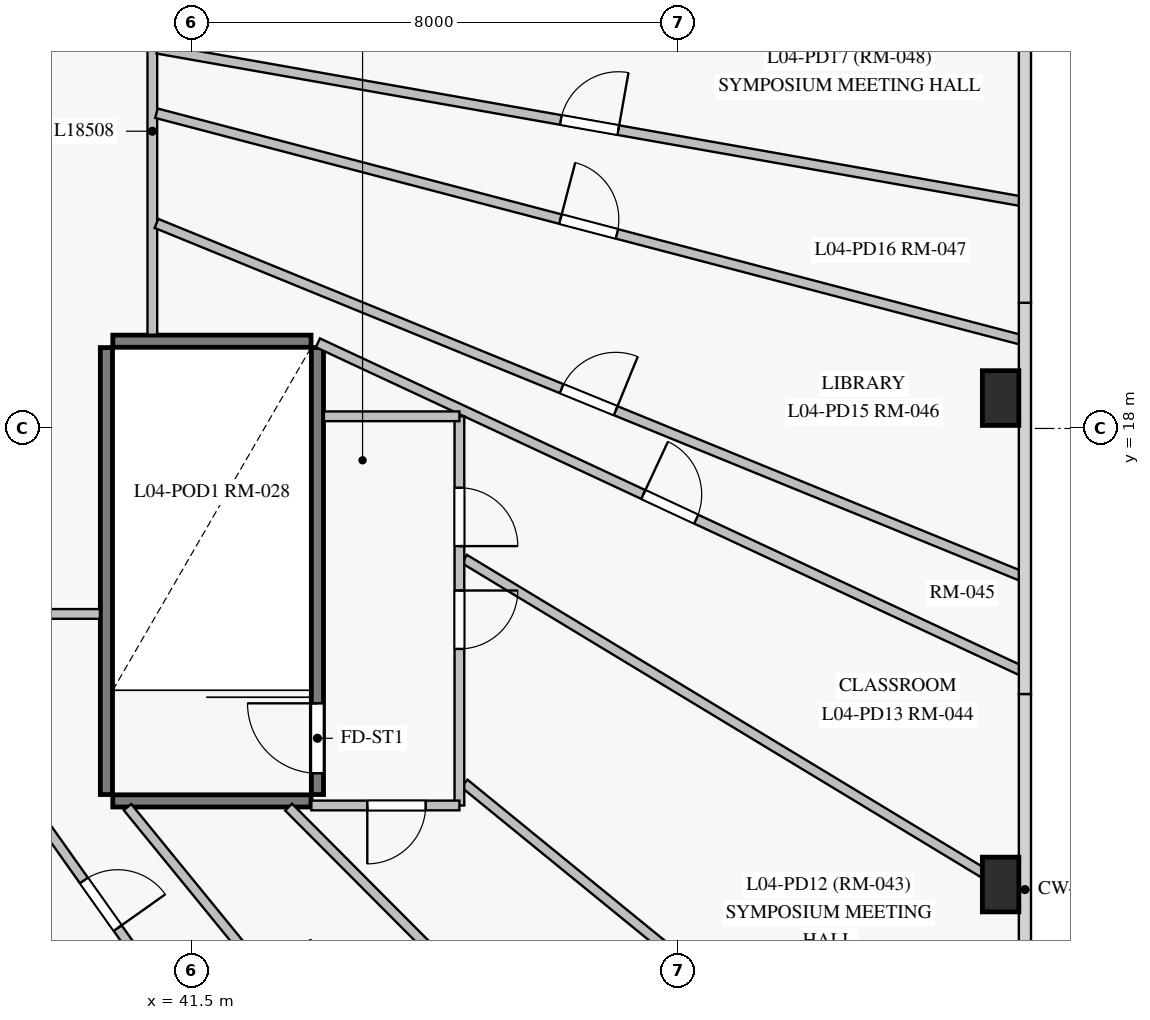
"""IFC4 building model, lengths in metres.
Left out: names, types, materials, properties, quantities, classifications, styles, units other than length and angle.
Written with IfcOpenShell. Run it as: python <this file> out.ifc"""

import sys

from ifc_helpers import new_model, si_unit, direction, frame, frame_2d, origin, origin_with_axes, origin_2d, place, context, subcontext, project, spatial, rectangle, extrude, source, transform, mapped, element, fill, save


model = new_model("IFC4")
c1 = context("Model", 3, precision=1e-05, world=origin(), true_north=direction((0.0, 1.0)))
c2 = subcontext(c1, "Body", "Model", "MODEL_VIEW")
j1 = project(units=[si_unit("LENGTHUNIT", "METRE"), si_unit("PLANEANGLEUNIT", "RADIAN")], contexts=[c1])
p1 = place(None, origin())
s1 = spatial("IfcSite", under=j1, at=p1, CompositionType="ELEMENT")
p2 = place(p1, origin())
s2 = spatial("IfcBuilding", under=s1, at=p2, CompositionType="ELEMENT")
p3 = place(p2, frame((0.0, 0.0, 18.0)))
s3 = spatial("IfcBuildingStorey", under=s2, at=p3, CompositionType="ELEMENT", Elevation=18.0)
m1 = source(origin_with_axes(), c2, "Body", "SweptSolid", [
    extrude(rectangle(XDim=0.6, YDim=0.9, at=origin_2d()), origin(), (0.0, 0.0, 1.0), 4.5),
])
for number, where, z_axis, x_axis in (
    (1, (54.8, 10.5, 0.0), (0.0, 0.0, 1.0), (1.0, 0.0, 0.0)),
    (2, (54.8, 18.5, 0.0), (0.0, 0.0, 1.0), (1.0, 0.0, 0.0)),
):
    element("IfcColumn", number, at=place(p3, frame(where, z_axis=z_axis, x_axis=x_axis)), inside=s3, PredefinedType="PILASTER", context=c2, shape_type="MappedRepresentation", body=[
        mapped(m1, transform((0.0, 0.0, 0.0), scale=1.0)),
    ])
p4 = place(p3, frame((40.095, 11.98, 0.0), z_axis=(0.0, 0.0, 1.0), x_axis=(0.0, 1.0, 0.0)))
e3 = element("IfcWall", 3, at=p4, inside=s3, PredefinedType="SHEAR", context=c2, shape_type="SweptSolid", body=[
    extrude(rectangle(XDim=7.35, YDim=0.2, at=frame_2d((3.675, 0.0))), origin(), (0.0, 0.0, 1.0), 4.225),
])
p5 = place(p3, frame((43.565, 11.98, 0.0), z_axis=(0.0, 0.0, 1.0), x_axis=(0.0, 1.0, 0.0)))
e4 = element("IfcWall", 4, at=p5, inside=s3, PredefinedType="SHEAR", context=c2, shape_type="SweptSolid", body=[
    extrude(rectangle(XDim=7.35, YDim=0.2, at=frame_2d((3.675, 0.0))), origin(), (0.0, 0.0, 1.0), 4.225),
])
p6 = place(p5, frame((0.35, 0.0, 0.0)))
e5 = element("IfcOpeningElement", 5, at=p6, cuts=e4, PredefinedType="OPENING", context=c2, shape_type="SweptSolid", body=[
    extrude(rectangle(XDim=1.15, YDim=2.15, at=frame_2d((0.575, 1.075))), frame((0.0, 0.11, 0.0), z_axis=(0.0, -1.0, 0.0), x_axis=(1.0, 0.0, 0.0)), (0.0, 0.0, 1.0), 0.22),
])
for number, where, z_axis, x_axis in (
    (6, (40.2, 11.875, 0.0), (0.0, 0.0, 1.0), (1.0, 0.0, 0.0)),
    (7, (40.2, 19.435, 0.0), (0.0, 0.0, 1.0), (1.0, 0.0, 0.0)),
):
    element("IfcWall", number, at=place(p3, frame(where, z_axis=z_axis, x_axis=x_axis)), inside=s3, PredefinedType="SHEAR", context=c2, shape_type="SweptSolid", body=[
        extrude(rectangle(XDim=3.26, YDim=0.2, at=frame_2d((1.63, 0.0))), origin(), (0.0, 0.0, 1.0), 4.225),
    ])
p7 = place(p3, frame((40.85, 38.05, 0.0), z_axis=(0.0, 0.0, 1.0), x_axis=(0.0, -1.0, 0.0)))
e8 = element("IfcWall", 8, at=p7, inside=s3, PredefinedType="PARTITIONING", context=c2, shape_type="SweptSolid", body=[
    extrude(rectangle(XDim=18.508, YDim=0.16, at=frame_2d((9.254, 0.0))), origin(), (0.0, 0.0, 1.0), 2.725),
])
p8 = place(p7, frame((10.856, 0.0, 0.0)))
e9 = element("IfcOpeningElement", 9, at=p8, cuts=e8, PredefinedType="OPENING", context=c2, shape_type="SweptSolid", body=[
    extrude(rectangle(XDim=0.96, YDim=2.15, at=frame_2d((0.48, 1.075))), frame((0.0, 0.09, 0.0), z_axis=(0.0, -1.0, 0.0), x_axis=(1.0, 0.0, 0.0)), (0.0, 0.0, 1.0), 0.18),
])
p9 = place(p7, frame((8.695, 0.0, 0.0)))
e10 = element("IfcOpeningElement", 10, at=p9, cuts=e8, PredefinedType="OPENING", context=c2, shape_type="SweptSolid", body=[
    extrude(rectangle(XDim=0.96, YDim=2.15, at=frame_2d((0.48, 1.075))), frame((0.0, 0.09, 0.0), z_axis=(0.0, -1.0, 0.0), x_axis=(1.0, 0.0, 0.0)), (0.0, 0.0, 1.0), 0.18),
])
p10 = place(p7, frame((5.944, 0.0, 0.0)))
e11 = element("IfcOpeningElement", 11, at=p10, cuts=e8, PredefinedType="OPENING", context=c2, shape_type="SweptSolid", body=[
    extrude(rectangle(XDim=0.96, YDim=2.15, at=frame_2d((0.48, 1.075))), frame((0.0, 0.09, 0.0), z_axis=(0.0, -1.0, 0.0), x_axis=(1.0, 0.0, 0.0)), (0.0, 0.0, 1.0), 0.18),
])
p11 = place(p3, frame((40.918, 21.372, 0.0), z_axis=(0.0, 0.0, 1.0), x_axis=(0.92597161246, -0.377593131449, 0.0)))
e12 = element("IfcWall", 12, at=p11, inside=s3, PredefinedType="PARTITIONING", context=c2, shape_type="SweptSolid", body=[
    extrude(rectangle(XDim=15.392, YDim=0.16, at=frame_2d((7.696, 0.0))), origin(), (0.0, 0.0, 1.0), 2.725),
])
p12 = place(p11, frame((7.196, 0.0, 0.0)))
e13 = element("IfcOpeningElement", 13, at=p12, cuts=e12, PredefinedType="OPENING", context=c2, shape_type="SweptSolid", body=[
    extrude(rectangle(XDim=0.96, YDim=2.15, at=frame_2d((0.48, 1.075))), frame((0.0, 0.09, 0.0), z_axis=(0.0, -1.0, 0.0), x_axis=(1.0, 0.0, 0.0)), (0.0, 0.0, 1.0), 0.18),
])
p13 = place(p3, frame((40.917, 23.184, 0.0), z_axis=(0.0, 0.0, 1.0), x_axis=(0.967334122043, -0.253504825064, 0.0)))
e14 = element("IfcWall", 14, at=p13, inside=s3, PredefinedType="PARTITIONING", context=c2, shape_type="SweptSolid", body=[
    extrude(rectangle(XDim=14.737, YDim=0.16, at=frame_2d((7.368, 0.0))), origin(), (0.0, 0.0, 1.0), 3.725),
])
p14 = place(p13, frame((6.868, 0.0, 0.0)))
e15 = element("IfcOpeningElement", 15, at=p14, cuts=e14, PredefinedType="OPENING", context=c2, shape_type="SweptSolid", body=[
    extrude(rectangle(XDim=0.96, YDim=2.15, at=frame_2d((0.48, 1.075))), frame((0.0, 0.09, 0.0), z_axis=(0.0, -1.0, 0.0), x_axis=(1.0, 0.0, 0.0)), (0.0, 0.0, 1.0), 0.18),
])
p15 = place(p3, frame((40.932, 24.244, 0.0), z_axis=(0.0, 0.0, 1.0), x_axis=(0.984776590319, -0.173824817446, 0.0)))
e16 = element("IfcWall", 16, at=p15, inside=s3, PredefinedType="PARTITIONING", context=c2, shape_type="SweptSolid", body=[
    extrude(rectangle(XDim=14.462, YDim=0.16, at=frame_2d((7.231, 0.0))), origin(), (0.0, 0.0, 1.0), 3.725),
])
p16 = place(p15, frame((6.739, 0.0, 0.0)))
e17 = element("IfcOpeningElement", 17, at=p16, cuts=e16, PredefinedType="OPENING", context=c2, shape_type="SweptSolid", body=[
    extrude(rectangle(XDim=0.96, YDim=2.15, at=frame_2d((0.48, 1.075))), frame((0.0, 0.09, 0.0), z_axis=(0.0, -1.0, 0.0), x_axis=(1.0, 0.0, 0.0)), (0.0, 0.0, 1.0), 0.18),
])
p17 = place(p3, frame((39.988, 14.95, 0.0), z_axis=(0.0, 0.0, 1.0), x_axis=(-1.0, 0.0, 0.0)))
e18 = element("IfcWall", 18, at=p17, inside=s3, PredefinedType="PARTITIONING", context=c2, shape_type="SweptSolid", body=[
    extrude(rectangle(XDim=14.588, YDim=0.16, at=frame_2d((7.294, 0.0))), origin(), (0.0, 0.0, 1.0), 2.825),
])
p18 = place(p17, frame((10.34, 0.0, 0.0)))
e19 = element("IfcOpeningElement", 19, at=p18, cuts=e18, PredefinedType="OPENING", context=c2, shape_type="SweptSolid", body=[
    extrude(rectangle(XDim=0.96, YDim=2.15, at=frame_2d((0.48, 1.075))), frame((0.0, 0.09, 0.0), z_axis=(0.0, -1.0, 0.0), x_axis=(1.0, 0.0, 0.0)), (0.0, 0.0, 1.0), 0.18),
])
p19 = place(p17, frame((6.735, 0.0, 0.0)))
e20 = element("IfcOpeningElement", 20, at=p19, cuts=e18, PredefinedType="OPENING", context=c2, shape_type="SweptSolid", body=[
    extrude(rectangle(XDim=0.96, YDim=2.15, at=frame_2d((0.48, 1.075))), frame((0.0, 0.09, 0.0), z_axis=(0.0, -1.0, 0.0), x_axis=(1.0, 0.0, 0.0)), (0.0, 0.0, 1.0), 0.18),
])
p20 = place(p17, frame((4.182, 0.0, 0.0)))
e21 = element("IfcOpeningElement", 21, at=p20, cuts=e18, PredefinedType="OPENING", context=c2, shape_type="SweptSolid", body=[
    extrude(rectangle(XDim=0.96, YDim=2.15, at=frame_2d((0.48, 1.075))), frame((0.0, 0.09, 0.0), z_axis=(0.0, -1.0, 0.0), x_axis=(1.0, 0.0, 0.0)), (0.0, 0.0, 1.0), 0.18),
])
p21 = place(p3, frame((43.573, 19.408, 0.0), z_axis=(0.0, 0.0, 1.0), x_axis=(0.906378533885, -0.422466511468, 0.0)))
e22 = element("IfcWall", 22, at=p21, inside=s3, PredefinedType="PARTITIONING", context=c2, shape_type="SweptSolid", body=[
    extrude(rectangle(XDim=12.794, YDim=0.16, at=frame_2d((6.397, 0.0))), origin(), (0.0, 0.0, 1.0), 2.725),
])
p22 = place(p21, frame((5.905, 0.0, 0.0)))
e23 = element("IfcOpeningElement", 23, at=p22, cuts=e22, PredefinedType="OPENING", context=c2, shape_type="SweptSolid", body=[
    extrude(rectangle(XDim=0.96, YDim=2.15, at=frame_2d((0.48, 1.075))), frame((0.0, 0.09, 0.0), z_axis=(0.0, -1.0, 0.0), x_axis=(1.0, 0.0, 0.0)), (0.0, 0.0, 1.0), 0.18),
])
p23 = place(p3, frame((36.666, 14.88, 0.0), z_axis=(0.0, 0.0, 1.0), x_axis=(0.578443831224, -0.815722216272, 0.0)))
e24 = element("IfcWall", 24, at=p23, inside=s3, PredefinedType="PARTITIONING", context=c2, shape_type="SweptSolid", body=[
    extrude(rectangle(XDim=11.576, YDim=0.16, at=frame_2d((5.788, 0.0))), origin(), (0.0, 0.0, 1.0), 4.225),
])
p24 = place(p23, frame((5.288, 0.0, 0.0)))
e25 = element("IfcOpeningElement", 25, at=p24, cuts=e24, PredefinedType="OPENING", context=c2, shape_type="SweptSolid", body=[
    extrude(rectangle(XDim=0.96, YDim=2.15, at=frame_2d((0.48, 1.075))), frame((0.0, 0.09, 0.0), z_axis=(0.0, -1.0, 0.0), x_axis=(1.0, 0.0, 0.0)), (0.0, 0.0, 1.0), 0.18),
])
p25 = place(p3, frame((45.982, 15.853, 0.0), z_axis=(0.0, 0.0, 1.0), x_axis=(0.855606653808, -0.517626558398, 0.0)))
e26 = element("IfcWall", 26, at=p25, inside=s3, PredefinedType="PARTITIONING", context=c2, shape_type="SweptSolid", body=[
    extrude(rectangle(XDim=10.733, YDim=0.16, at=frame_2d((5.367, 0.0))), origin(), (0.0, 0.0, 1.0), 4.225),
])
p26 = place(p3, frame((34.431, 14.868, 0.0), z_axis=(0.0, 0.0, 1.0), x_axis=(0.458318369651, -0.888788091752, 0.0)))
e27 = element("IfcWall", 27, at=p26, inside=s3, PredefinedType="PARTITIONING", context=c2, shape_type="SweptSolid", body=[
    extrude(rectangle(XDim=10.616, YDim=0.16, at=frame_2d((5.308, 0.0))), origin(), (0.0, 0.0, 1.0), 4.225),
])
p27 = place(p3, frame((45.982, 12.162, 0.0), z_axis=(0.0, 0.0, 1.0), x_axis=(0.774901017442, -0.632082599956, 0.0)))
e28 = element("IfcWall", 28, at=p27, inside=s3, PredefinedType="PARTITIONING", context=c2, shape_type="SweptSolid", body=[
    extrude(rectangle(XDim=10.053, YDim=0.16, at=frame_2d((5.027, 0.0))), origin(), (0.0, 0.0, 1.0), 4.225),
])
p28 = place(p3, frame((40.442, 11.773, 0.0), z_axis=(0.0, 0.0, 1.0), x_axis=(0.632298947072, -0.774724493954, 0.0)))
e29 = element("IfcWall", 29, at=p28, inside=s3, PredefinedType="PARTITIONING", context=c2, shape_type="SweptSolid", body=[
    extrude(rectangle(XDim=8.175, YDim=0.16, at=frame_2d((4.087, 0.0))), origin(), (0.0, 0.0, 1.0), 4.225),
])
p29 = place(p28, frame((3.595, 0.0, 0.0)))
e30 = element("IfcOpeningElement", 30, at=p29, cuts=e29, PredefinedType="OPENING", context=c2, shape_type="SweptSolid", body=[
    extrude(rectangle(XDim=0.96, YDim=2.15, at=frame_2d((0.48, 1.075))), frame((0.0, 0.09, 0.0), z_axis=(0.0, -1.0, 0.0), x_axis=(1.0, 0.0, 0.0)), (0.0, 0.0, 1.0), 0.18),
])
p30 = place(p3, frame((45.9, 18.2, 0.0), z_axis=(0.0, 0.0, 1.0), x_axis=(0.0, -1.0, 0.0)))
e31 = element("IfcWall", 31, at=p30, inside=s3, PredefinedType="PARTITIONING", context=c2, shape_type="SweptSolid", body=[
    extrude(rectangle(XDim=6.4, YDim=0.16, at=frame_2d((3.2, 0.0))), origin(), (0.0, 0.0, 1.0), 4.225),
])
p31 = place(p30, frame((2.865, 0.0, 0.0)))
e32 = element("IfcOpeningElement", 32, at=p31, cuts=e31, PredefinedType="OPENING", context=c2, shape_type="SweptSolid", body=[
    extrude(rectangle(XDim=0.96, YDim=2.15, at=frame_2d((0.48, 1.075))), frame((0.0, 0.09, 0.0), z_axis=(0.0, -1.0, 0.0), x_axis=(1.0, 0.0, 0.0)), (0.0, 0.0, 1.0), 0.18),
])
p32 = place(p30, frame((1.175, 0.0, 0.0)))
e33 = element("IfcOpeningElement", 33, at=p32, cuts=e31, PredefinedType="OPENING", context=c2, shape_type="SweptSolid", body=[
    extrude(rectangle(XDim=0.96, YDim=2.15, at=frame_2d((0.48, 1.075))), frame((0.0, 0.09, 0.0), z_axis=(0.0, -1.0, 0.0), x_axis=(1.0, 0.0, 0.0)), (0.0, 0.0, 1.0), 0.18),
])
p33 = place(p3, frame((43.091, 11.773, 0.0), z_axis=(0.0, 0.0, 1.0), x_axis=(0.705853252823, -0.708358091278, 0.0)))
e34 = element("IfcWall", 34, at=p33, inside=s3, PredefinedType="PARTITIONING", context=c2, shape_type="SweptSolid", body=[
    extrude(rectangle(XDim=4.776, YDim=0.16, at=frame_2d((2.388, 0.0))), origin(), (0.0, 0.0, 1.0), 2.725),
])
p34 = place(p3, frame((45.9, 11.8, 0.0), z_axis=(0.0, 0.0, 1.0), x_axis=(-1.0, 0.0, 0.0)))
e35 = element("IfcWall", 35, at=p34, inside=s3, PredefinedType="PARTITIONING", context=c2, shape_type="SweptSolid", body=[
    extrude(rectangle(XDim=2.435, YDim=0.16, at=frame_2d((1.217, 0.0))), origin(), (0.0, 0.0, 1.0), 4.225),
])
p35 = place(p34, frame((0.555, 0.0, 0.0)))
e36 = element("IfcOpeningElement", 36, at=p35, cuts=e35, PredefinedType="OPENING", context=c2, shape_type="SweptSolid", body=[
    extrude(rectangle(XDim=0.96, YDim=2.15, at=frame_2d((0.48, 1.075))), frame((0.0, 0.09, 0.0), z_axis=(0.0, -1.0, 0.0), x_axis=(1.0, 0.0, 0.0)), (0.0, 0.0, 1.0), 0.18),
])
p36 = place(p3, frame((43.672, 18.2, 0.0), z_axis=(0.0, 0.0, 1.0), x_axis=(1.0, 0.0, 0.0)))
e37 = element("IfcWall", 37, at=p36, inside=s3, PredefinedType="PARTITIONING", context=c2, shape_type="SweptSolid", body=[
    extrude(rectangle(XDim=2.228, YDim=0.16, at=frame_2d((1.114, 0.0))), origin(), (0.0, 0.0, 1.0), 4.225),
])
m2 = source(origin_with_axes(), c2, "Body", "SweptSolid", [
    extrude(rectangle(XDim=1.15, YDim=2.15, at=frame_2d((0.575, 1.075))), frame((0.0, 0.025, 0.0), z_axis=(0.0, -1.0, 0.0), x_axis=(1.0, 0.0, 0.0)), (0.0, 0.0, 1.0), 0.05),
])
p37 = place(p6, origin())
e38 = element("IfcDoor", 38, at=p37, inside=s3, OperationType="SINGLE_SWING_RIGHT", PredefinedType="DOOR", context=c2, shape_type="MappedRepresentation", body=[
    mapped(m2, transform((0.0, 0.0, 0.0), scale=1.0)),
])
fill(e5, e38)
m3 = source(origin_with_axes(), c2, "Body", "SweptSolid", [
    extrude(rectangle(XDim=0.96, YDim=2.15, at=frame_2d((0.48, 1.075))), frame((0.0, 0.025, 0.0), z_axis=(0.0, -1.0, 0.0), x_axis=(1.0, 0.0, 0.0)), (0.0, 0.0, 1.0), 0.05),
])
p38 = place(p24, origin())
e39 = element("IfcDoor", 39, at=p38, inside=s3, OperationType="SINGLE_SWING_RIGHT", PredefinedType="DOOR", context=c2, shape_type="MappedRepresentation", body=[
    mapped(m3, transform((0.0, 0.0, 0.0), scale=1.0)),
])
fill(e25, e39)
p39 = place(p35, origin())
e40 = element("IfcDoor", 40, at=p39, inside=s3, OperationType="SINGLE_SWING_RIGHT", PredefinedType="DOOR", context=c2, shape_type="MappedRepresentation", body=[
    mapped(m3, transform((0.0, 0.0, 0.0), scale=1.0)),
])
fill(e36, e40)
p40 = place(p31, origin())
e41 = element("IfcDoor", 41, at=p40, inside=s3, OperationType="SINGLE_SWING_LEFT", PredefinedType="DOOR", context=c2, shape_type="MappedRepresentation", body=[
    mapped(m3, transform((0.0, 0.0, 0.0), scale=1.0)),
])
fill(e32, e41)
p41 = place(p32, origin())
e42 = element("IfcDoor", 42, at=p41, inside=s3, OperationType="SINGLE_SWING_RIGHT", PredefinedType="DOOR", context=c2, shape_type="MappedRepresentation", body=[
    mapped(m3, transform((0.0, 0.0, 0.0), scale=1.0)),
])
fill(e33, e42)
p42 = place(p22, origin())
e43 = element("IfcDoor", 43, at=p42, inside=s3, OperationType="SINGLE_SWING_LEFT", PredefinedType="DOOR", context=c2, shape_type="MappedRepresentation", body=[
    mapped(m3, transform((0.0, 0.0, 0.0), scale=1.0)),
])
fill(e23, e43)
p43 = place(p12, origin())
e44 = element("IfcDoor", 44, at=p43, inside=s3, OperationType="SINGLE_SWING_RIGHT", PredefinedType="DOOR", context=c2, shape_type="MappedRepresentation", body=[
    mapped(m3, transform((0.0, 0.0, 0.0), scale=1.0)),
])
fill(e13, e44)
p44 = place(p14, origin())
e45 = element("IfcDoor", 45, at=p44, inside=s3, OperationType="SINGLE_SWING_LEFT", PredefinedType="DOOR", context=c2, shape_type="MappedRepresentation", body=[
    mapped(m3, transform((0.0, 0.0, 0.0), scale=1.0)),
])
fill(e15, e45)
p45 = place(p16, origin())
e46 = element("IfcDoor", 46, at=p45, inside=s3, OperationType="SINGLE_SWING_RIGHT", PredefinedType="DOOR", context=c2, shape_type="MappedRepresentation", body=[
    mapped(m3, transform((0.0, 0.0, 0.0), scale=1.0)),
])
fill(e17, e46)
save(model, sys.argv[1])
